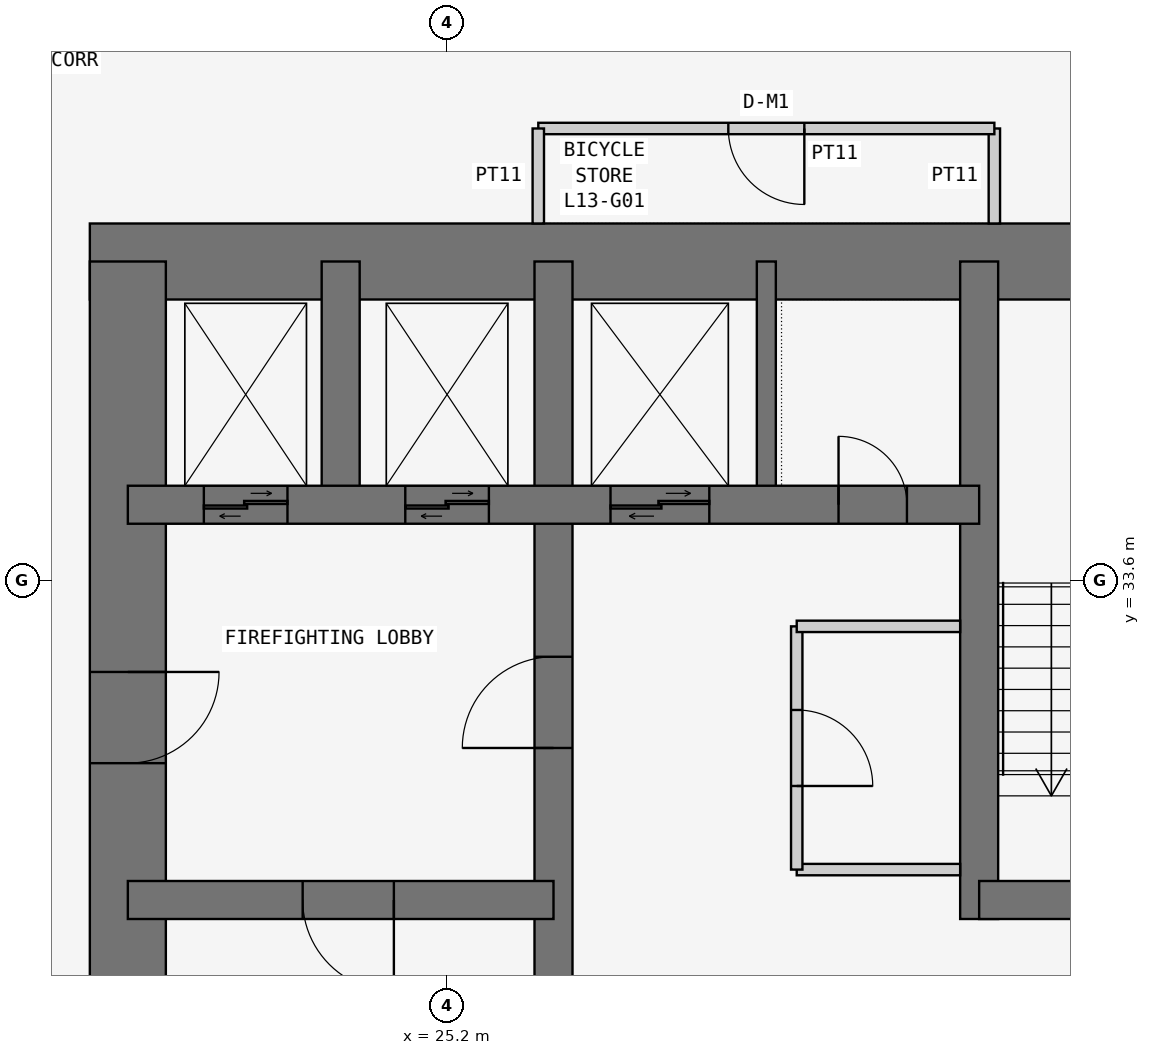
"""IFC4 building model, lengths in metres.
Left out: names, types, materials, properties, quantities, classifications, styles, units other than length and angle.
Written with IfcOpenShell. Run it as: python <this file> out.ifc"""

import sys

from ifc_helpers import new_model, si_unit, direction, frame, frame_2d, origin, place, context, subcontext, project, spatial, rectangle, extrude, element, fill, save


model = new_model("IFC4")
c1 = context("Model", 3, precision=1e-05, world=origin(), true_north=direction((0.0, 1.0)))
c2 = subcontext(c1, "Body", "Model", "MODEL_VIEW")
j1 = project(units=[si_unit("LENGTHUNIT", "METRE"), si_unit("PLANEANGLEUNIT", "RADIAN")], contexts=[c1])
p1 = place(None, origin())
s1 = spatial("IfcSite", under=j1, at=p1, CompositionType="ELEMENT")
p2 = place(p1, origin())
s2 = spatial("IfcBuilding", under=s1, at=p2, CompositionType="ELEMENT")
p3 = place(p2, frame((0.0, 0.0, 56.1)))
s3 = spatial("IfcBuildingStorey", under=s2, at=p3, CompositionType="ELEMENT", Elevation=56.1)
p4 = place(p3, frame((37.8, 37.8, 0.0), z_axis=(0.0, 0.0, 1.0), x_axis=(-1.0, 0.0, 0.0)))
e1 = element("IfcWall", 1, at=p4, inside=s3, PredefinedType="SHEAR", context=c2, shape_type="SweptSolid", body=[
    extrude(rectangle(XDim=17.3, YDim=1.0, at=frame_2d((8.65, 0.0))), origin(), (0.0, 0.0, 1.0), 3.6),
])
p5 = place(p3, frame((21.0, 37.8, 0.0), z_axis=(0.0, 0.0, 1.0), x_axis=(0.0, -1.0, 0.0)))
e2 = element("IfcWall", 2, at=p5, inside=s3, PredefinedType="SHEAR", context=c2, shape_type="SweptSolid", body=[
    extrude(rectangle(XDim=17.3, YDim=1.0, at=frame_2d((8.65, 0.0))), origin(), (0.0, 0.0, 1.0), 3.6),
])
p6 = place(p5, frame((5.4, 0.0, 0.0)))
e3 = element("IfcOpeningElement", 3, at=p6, cuts=e2, PredefinedType="OPENING", context=c2, shape_type="SweptSolid", body=[
    extrude(rectangle(XDim=1.2, YDim=2.1, at=frame_2d((0.6, 1.05))), frame((0.0, 0.51, 0.0), z_axis=(0.0, -1.0, 0.0), x_axis=(1.0, 0.0, 0.0)), (0.0, 0.0, 1.0), 1.02),
])
p7 = place(p3, frame((26.6, 21.0, 0.0), z_axis=(0.0, 0.0, 1.0), x_axis=(0.0, 1.0, 0.0)))
e4 = element("IfcWall", 4, at=p7, inside=s3, PredefinedType="SHEAR", context=c2, shape_type="SweptSolid", body=[
    extrude(rectangle(XDim=16.8, YDim=0.5, at=frame_2d((8.4, 0.0))), origin(), (0.0, 0.0, 1.0), 3.6),
])
p8 = place(p7, frame((10.4, 0.0, 0.0)))
e5 = element("IfcOpeningElement", 5, at=p8, cuts=e4, PredefinedType="OPENING", context=c2, shape_type="SweptSolid", body=[
    extrude(rectangle(XDim=1.2, YDim=2.1, at=frame_2d((0.6, 1.05))), frame((0.0, 0.26, 0.0), z_axis=(0.0, -1.0, 0.0), x_axis=(1.0, 0.0, 0.0)), (0.0, 0.0, 1.0), 0.52),
])
p9 = place(p3, frame((21.0, 29.4, 0.0), z_axis=(0.0, 0.0, 1.0), x_axis=(1.0, 0.0, 0.0)))
e6 = element("IfcWall", 6, at=p9, inside=s3, PredefinedType="SHEAR", context=c2, shape_type="SweptSolid", body=[
    extrude(rectangle(XDim=5.6, YDim=0.5, at=frame_2d((2.8, 0.0))), origin(), (0.0, 0.0, 1.0), 3.6),
])
p10 = place(p9, frame((2.3, 0.0, 0.0)))
e7 = element("IfcOpeningElement", 7, at=p10, cuts=e6, PredefinedType="OPENING", context=c2, shape_type="SweptSolid", body=[
    extrude(rectangle(XDim=1.2, YDim=2.1, at=frame_2d((0.6, 1.05))), frame((0.0, 0.26, 0.0), z_axis=(0.0, -1.0, 0.0), x_axis=(1.0, 0.0, 0.0)), (0.0, 0.0, 1.0), 0.52),
])
p11 = place(p3, frame((21.0, 34.6, 0.0), z_axis=(0.0, 0.0, 1.0), x_axis=(1.0, 0.0, 0.0)))
e8 = element("IfcWall", 8, at=p11, inside=s3, PredefinedType="SHEAR", context=c2, shape_type="SweptSolid", body=[
    extrude(rectangle(XDim=11.2, YDim=0.5, at=frame_2d((5.6, 0.0))), origin(), (0.0, 0.0, 1.0), 3.6),
])
p12 = place(p11, frame((9.35, 0.0, 0.0)))
e9 = element("IfcOpeningElement", 9, at=p12, cuts=e8, PredefinedType="OPENING", context=c2, shape_type="SweptSolid", body=[
    extrude(rectangle(XDim=0.9, YDim=2.1, at=frame_2d((0.45, 1.05))), frame((0.0, 0.26, 0.0), z_axis=(0.0, -1.0, 0.0), x_axis=(1.0, 0.0, 0.0)), (0.0, 0.0, 1.0), 0.52),
])
p13 = place(p11, frame((1.0, 0.0, 0.0)))
e10 = element("IfcOpeningElement", 10, at=p13, cuts=e8, PredefinedType="OPENING", context=c2, shape_type="SweptSolid", body=[
    extrude(rectangle(XDim=1.1, YDim=2.1, at=frame_2d((0.55, 1.05))), frame((0.0, 0.26, 0.0), z_axis=(0.0, -1.0, 0.0), x_axis=(1.0, 0.0, 0.0)), (0.0, 0.0, 1.0), 0.52),
])
p14 = place(p11, frame((3.65, 0.0, 0.0)))
e11 = element("IfcOpeningElement", 11, at=p14, cuts=e8, PredefinedType="OPENING", context=c2, shape_type="SweptSolid", body=[
    extrude(rectangle(XDim=1.1, YDim=2.1, at=frame_2d((0.55, 1.05))), frame((0.0, 0.26, 0.0), z_axis=(0.0, -1.0, 0.0), x_axis=(1.0, 0.0, 0.0)), (0.0, 0.0, 1.0), 0.52),
])
p15 = place(p11, frame((6.35, 0.0, 0.0)))
e12 = element("IfcOpeningElement", 12, at=p15, cuts=e8, PredefinedType="OPENING", context=c2, shape_type="SweptSolid", body=[
    extrude(rectangle(XDim=1.3, YDim=2.1, at=frame_2d((0.65, 1.05))), frame((0.0, 0.26, 0.0), z_axis=(0.0, -1.0, 0.0), x_axis=(1.0, 0.0, 0.0)), (0.0, 0.0, 1.0), 0.52),
])
p16 = place(p3, frame((23.8, 34.6, 0.0), z_axis=(0.0, 0.0, 1.0), x_axis=(0.0, 1.0, 0.0)))
e13 = element("IfcWall", 13, at=p16, inside=s3, PredefinedType="SHEAR", context=c2, shape_type="SweptSolid", body=[
    extrude(rectangle(XDim=3.2, YDim=0.5, at=frame_2d((1.6, 0.0))), origin(), (0.0, 0.0, 1.0), 3.6),
])
p17 = place(p3, frame((32.2, 29.15, 0.0), z_axis=(0.0, 0.0, 1.0), x_axis=(0.0, 1.0, 0.0)))
e14 = element("IfcWall", 14, at=p17, inside=s3, PredefinedType="SHEAR", context=c2, shape_type="SweptSolid", body=[
    extrude(rectangle(XDim=8.65, YDim=0.5, at=frame_2d((4.325, 0.0))), origin(), (0.0, 0.0, 1.0), 3.6),
])
p18 = place(p3, frame((32.2, 29.4, 0.0), z_axis=(0.0, 0.0, 1.0), x_axis=(1.0, 0.0, 0.0)))
e15 = element("IfcWall", 15, at=p18, inside=s3, PredefinedType="SHEAR", context=c2, shape_type="SweptSolid", body=[
    extrude(rectangle(XDim=5.6, YDim=0.5, at=frame_2d((2.8, 0.0))), origin(), (0.0, 0.0, 1.0), 3.6),
])
p19 = place(p18, frame((2.0, 0.0, 0.0)))
e16 = element("IfcOpeningElement", 16, at=p19, cuts=e15, PredefinedType="OPENING", context=c2, shape_type="SweptSolid", body=[
    extrude(rectangle(XDim=1.2, YDim=2.1, at=frame_2d((0.6, 1.05))), frame((0.0, 0.26, 0.0), z_axis=(0.0, -1.0, 0.0), x_axis=(1.0, 0.0, 0.0)), (0.0, 0.0, 1.0), 0.52),
])
p20 = place(p3, frame((29.4, 34.6, 0.0), z_axis=(0.0, 0.0, 1.0), x_axis=(0.0, 1.0, 0.0)))
e17 = element("IfcWall", 17, at=p20, inside=s3, PredefinedType="SHEAR", context=c2, shape_type="SweptSolid", body=[
    extrude(rectangle(XDim=3.2, YDim=0.25, at=frame_2d((1.6, 0.0))), origin(), (0.0, 0.0, 1.0), 3.6),
])
p21 = place(p3, frame((32.4, 38.3, 0.0), z_axis=(0.0, 0.0, 1.0), x_axis=(0.0, 1.0, 0.0)))
e18 = element("IfcWall", 18, at=p21, inside=s3, PredefinedType="PARTITIONING", context=c2, shape_type="SweptSolid", body=[
    extrude(rectangle(XDim=1.25, YDim=0.15, at=frame_2d((0.625, 0.0))), origin(), (0.0, 0.0, 1.0), 3.45),
])
p22 = place(p3, frame((32.4, 39.55, 0.0), z_axis=(0.0, 0.0, 1.0), x_axis=(-1.0, 0.0, 0.0)))
e19 = element("IfcWall", 19, at=p22, inside=s3, PredefinedType="PARTITIONING", context=c2, shape_type="SweptSolid", body=[
    extrude(rectangle(XDim=6.0, YDim=0.15, at=frame_2d((3.0, 0.0))), origin(), (0.0, 0.0, 1.0), 3.45),
])
p23 = place(p22, frame((2.5, 0.0, 0.0)))
e20 = element("IfcOpeningElement", 20, at=p23, cuts=e19, PredefinedType="OPENING", context=c2, shape_type="SweptSolid", body=[
    extrude(rectangle(XDim=1.0, YDim=2.1, at=frame_2d((0.5, 1.05))), frame((0.0, 0.085, 0.0), z_axis=(0.0, -1.0, 0.0), x_axis=(1.0, 0.0, 0.0)), (0.0, 0.0, 1.0), 0.17),
])
p24 = place(p3, frame((26.4, 39.55, 0.0), z_axis=(0.0, 0.0, 1.0), x_axis=(0.0, -1.0, 0.0)))
e21 = element("IfcWall", 21, at=p24, inside=s3, PredefinedType="PARTITIONING", context=c2, shape_type="SweptSolid", body=[
    extrude(rectangle(XDim=1.25, YDim=0.15, at=frame_2d((0.625, 0.0))), origin(), (0.0, 0.0, 1.0), 3.45),
])
p25 = place(p3, frame((31.95, 29.8, 0.0), z_axis=(0.0, 0.0, 1.0), x_axis=(-1.0, 0.0, 0.0)))
e22 = element("IfcWall", 22, at=p25, inside=s3, PredefinedType="PARTITIONING", context=c2, shape_type="SweptSolid", body=[
    extrude(rectangle(XDim=2.15, YDim=0.15, at=frame_2d((1.075, 0.0))), origin(), (0.0, 0.0, 1.0), 3.45),
])
p26 = place(p3, frame((29.8, 29.8, 0.0), z_axis=(0.0, 0.0, 1.0), x_axis=(0.0, 1.0, 0.0)))
e23 = element("IfcWall", 23, at=p26, inside=s3, PredefinedType="PARTITIONING", context=c2, shape_type="SweptSolid", body=[
    extrude(rectangle(XDim=3.2, YDim=0.15, at=frame_2d((1.6, 0.0))), origin(), (0.0, 0.0, 1.0), 3.45),
])
p27 = place(p26, frame((1.1, 0.0, 0.0)))
e24 = element("IfcOpeningElement", 24, at=p27, cuts=e23, PredefinedType="OPENING", context=c2, shape_type="SweptSolid", body=[
    extrude(rectangle(XDim=1.0, YDim=2.1, at=frame_2d((0.5, 1.05))), frame((0.0, 0.085, 0.0), z_axis=(0.0, -1.0, 0.0), x_axis=(1.0, 0.0, 0.0)), (0.0, 0.0, 1.0), 0.17),
])
p28 = place(p3, frame((29.8, 33.0, 0.0), z_axis=(0.0, 0.0, 1.0), x_axis=(1.0, 0.0, 0.0)))
e25 = element("IfcWall", 25, at=p28, inside=s3, PredefinedType="PARTITIONING", context=c2, shape_type="SweptSolid", body=[
    extrude(rectangle(XDim=2.15, YDim=0.15, at=frame_2d((1.075, 0.0))), origin(), (0.0, 0.0, 1.0), 3.45),
])
p29 = place(p23, origin())
e26 = element("IfcDoor", 26, at=p29, inside=s3, OperationType="SINGLE_SWING_LEFT", PredefinedType="DOOR", context=c2, shape_type="SweptSolid", body=[
    extrude(rectangle(XDim=1.0, YDim=2.1, at=frame_2d((0.5, 1.05))), frame((0.0, 0.025, 0.0), z_axis=(0.0, -1.0, 0.0), x_axis=(1.0, 0.0, 0.0)), (0.0, 0.0, 1.0), 0.05),
])
fill(e20, e26)
p30 = place(p6, origin())
e27 = element("IfcDoor", 27, at=p30, inside=s3, OperationType="SINGLE_SWING_LEFT", PredefinedType="DOOR", context=c2, shape_type="SweptSolid", body=[
    extrude(rectangle(XDim=1.2, YDim=2.1, at=frame_2d((0.6, 1.05))), frame((0.0, 0.025, 0.0), z_axis=(0.0, -1.0, 0.0), x_axis=(1.0, 0.0, 0.0)), (0.0, 0.0, 1.0), 0.05),
])
fill(e3, e27)
p31 = place(p10, frame((1.2, 0.0, 0.0), z_axis=(0.0, 0.0, 1.0), x_axis=(-1.0, 0.0, 0.0)))
e28 = element("IfcDoor", 28, at=p31, inside=s3, OperationType="SINGLE_SWING_LEFT", PredefinedType="DOOR", context=c2, shape_type="SweptSolid", body=[
    extrude(rectangle(XDim=1.2, YDim=2.1, at=frame_2d((0.6, 1.05))), frame((0.0, 0.025, 0.0), z_axis=(0.0, -1.0, 0.0), x_axis=(1.0, 0.0, 0.0)), (0.0, 0.0, 1.0), 0.05),
])
fill(e7, e28)
p32 = place(p8, origin())
e29 = element("IfcDoor", 29, at=p32, inside=s3, OperationType="SINGLE_SWING_LEFT", PredefinedType="DOOR", context=c2, shape_type="SweptSolid", body=[
    extrude(rectangle(XDim=1.2, YDim=2.1, at=frame_2d((0.6, 1.05))), frame((0.0, 0.025, 0.0), z_axis=(0.0, -1.0, 0.0), x_axis=(1.0, 0.0, 0.0)), (0.0, 0.0, 1.0), 0.05),
])
fill(e5, e29)
p33 = place(p12, origin())
e30 = element("IfcDoor", 30, at=p33, inside=s3, OperationType="SINGLE_SWING_LEFT", PredefinedType="DOOR", context=c2, shape_type="SweptSolid", body=[
    extrude(rectangle(XDim=0.9, YDim=2.1, at=frame_2d((0.45, 1.05))), frame((0.0, 0.025, 0.0), z_axis=(0.0, -1.0, 0.0), x_axis=(1.0, 0.0, 0.0)), (0.0, 0.0, 1.0), 0.05),
])
fill(e9, e30)
p34 = place(p27, frame((1.0, 0.0, 0.0), z_axis=(0.0, 0.0, 1.0), x_axis=(-1.0, 0.0, 0.0)))
e31 = element("IfcDoor", 31, at=p34, inside=s3, OperationType="SINGLE_SWING_RIGHT", PredefinedType="DOOR", context=c2, shape_type="SweptSolid", body=[
    extrude(rectangle(XDim=1.0, YDim=2.1, at=frame_2d((0.5, 1.05))), frame((0.0, 0.025, 0.0), z_axis=(0.0, -1.0, 0.0), x_axis=(1.0, 0.0, 0.0)), (0.0, 0.0, 1.0), 0.05),
])
fill(e24, e31)
p35 = place(p13, origin())
e32 = element("IfcDoor", 32, at=p35, inside=s3, OperationType="DOUBLE_DOOR_SLIDING", PredefinedType="DOOR", context=c2, shape_type="SweptSolid", body=[
    extrude(rectangle(XDim=1.1, YDim=2.1, at=frame_2d((0.55, 1.05))), frame((0.0, 0.025, 0.0), z_axis=(0.0, -1.0, 0.0), x_axis=(1.0, 0.0, 0.0)), (0.0, 0.0, 1.0), 0.05),
])
fill(e10, e32)
p36 = place(p14, origin())
e33 = element("IfcDoor", 33, at=p36, inside=s3, OperationType="DOUBLE_DOOR_SLIDING", PredefinedType="DOOR", context=c2, shape_type="SweptSolid", body=[
    extrude(rectangle(XDim=1.1, YDim=2.1, at=frame_2d((0.55, 1.05))), frame((0.0, 0.025, 0.0), z_axis=(0.0, -1.0, 0.0), x_axis=(1.0, 0.0, 0.0)), (0.0, 0.0, 1.0), 0.05),
])
fill(e11, e33)
p37 = place(p15, origin())
e34 = element("IfcDoor", 34, at=p37, inside=s3, OperationType="DOUBLE_DOOR_SLIDING", PredefinedType="DOOR", context=c2, shape_type="SweptSolid", body=[
    extrude(rectangle(XDim=1.3, YDim=2.1, at=frame_2d((0.65, 1.05))), frame((0.0, 0.025, 0.0), z_axis=(0.0, -1.0, 0.0), x_axis=(1.0, 0.0, 0.0)), (0.0, 0.0, 1.0), 0.05),
])
fill(e12, e34)
save(model, sys.argv[1])
